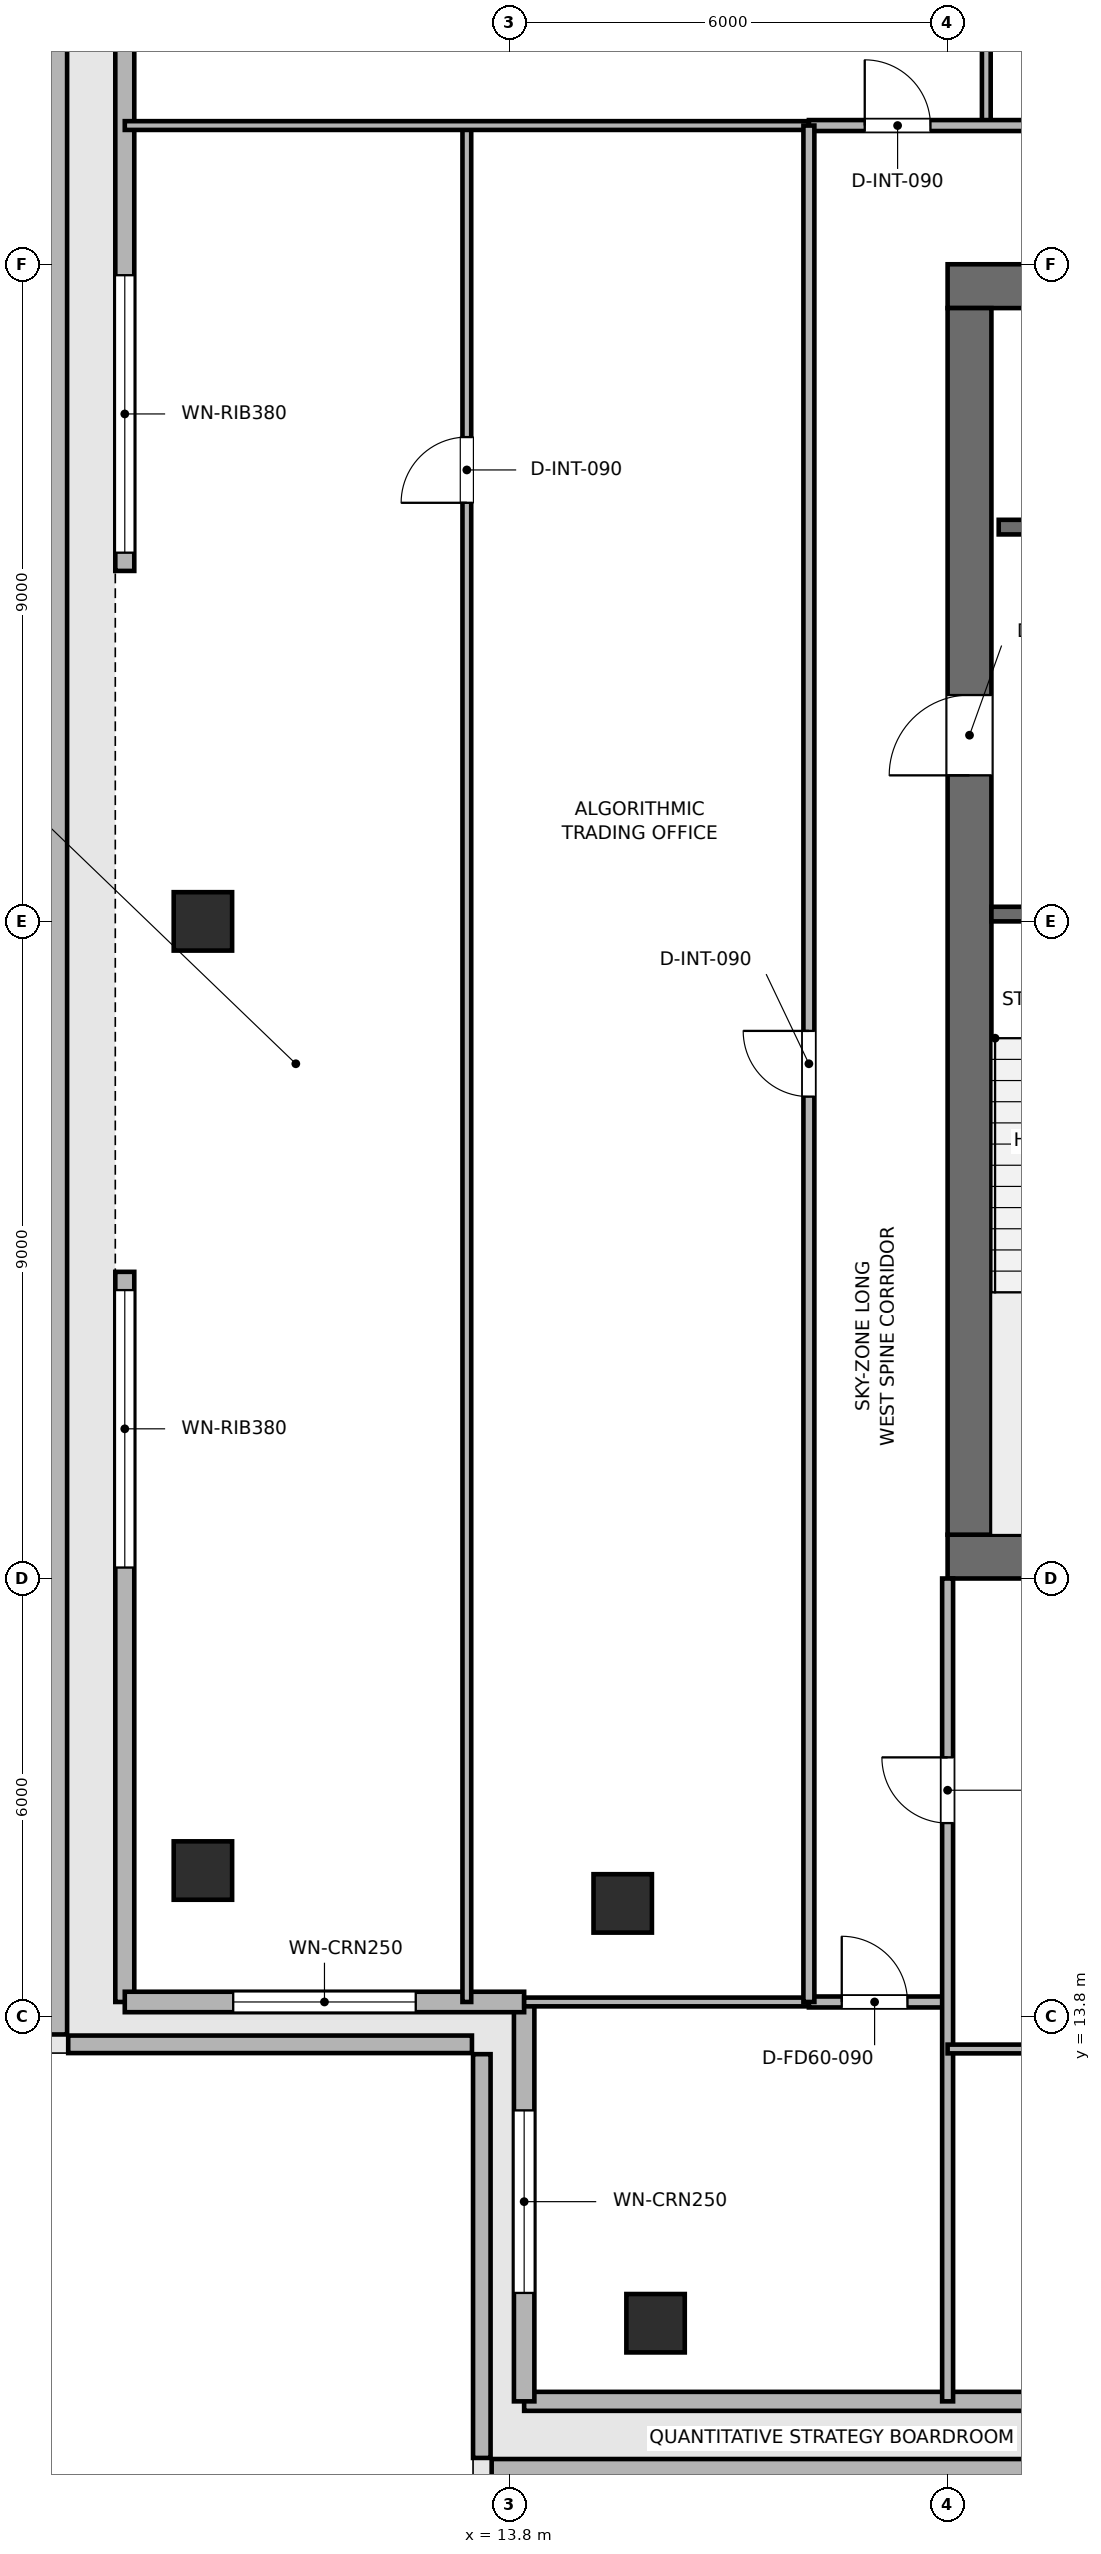
"""IFC4 building model, lengths in metres.
Left out: names, types, materials, properties, quantities, classifications, styles, units other than length and angle.
Written with IfcOpenShell. Run it as: python <this file> out.ifc"""

import sys

from ifc_helpers import new_model, si_unit, direction, frame, frame_2d, origin, origin_2d, place, context, subcontext, project, spatial, rectangle, extrude, element, fill, save


model = new_model("IFC4")
c1 = context("Model", 3, precision=1e-05, world=origin(), true_north=direction((0.0, 1.0)))
c2 = subcontext(c1, "Body", "Model", "MODEL_VIEW")
j1 = project(units=[si_unit("LENGTHUNIT", "METRE"), si_unit("PLANEANGLEUNIT", "RADIAN")], contexts=[c1])
p1 = place(None, origin())
s1 = spatial("IfcSite", under=j1, at=p1, CompositionType="ELEMENT")
p2 = place(p1, origin())
s2 = spatial("IfcBuilding", under=s1, at=p2, CompositionType="ELEMENT")
p3 = place(p2, frame((0.0, 0.0, 355.5)))
s3 = spatial("IfcBuildingStorey", under=s2, at=p3, CompositionType="ELEMENT", Elevation=355.5)
p4 = place(p3, frame((19.8, 20.1, 0.0), z_axis=(0.0, 0.0, 1.0), x_axis=(1.0, 0.0, 0.0)))
e1 = element("IfcWall", 1, at=p4, inside=s3, PredefinedType="SHEAR", context=c2, shape_type="SweptSolid", body=[
    extrude(rectangle(XDim=18.0, YDim=0.6, at=frame_2d((9.0, 0.0))), origin(), (0.0, 0.0, 1.0), 4.5),
])
p5 = place(p3, frame((19.8, 37.5, 0.0), z_axis=(0.0, 0.0, 1.0), x_axis=(1.0, 0.0, 0.0)))
e2 = element("IfcWall", 2, at=p5, inside=s3, PredefinedType="SHEAR", context=c2, shape_type="SweptSolid", body=[
    extrude(rectangle(XDim=18.0, YDim=0.6, at=frame_2d((9.0, 0.0))), origin(), (0.0, 0.0, 1.0), 4.5),
])
p6 = place(p5, frame((7.05, 0.0, 0.0)))
e3 = element("IfcOpeningElement", 3, at=p6, cuts=e2, PredefinedType="OPENING", context=c2, shape_type="SweptSolid", body=[
    extrude(rectangle(XDim=1.1, YDim=2.15, at=frame_2d((0.55, 1.075))), frame((0.0, 0.31, 0.0), z_axis=(0.0, -1.0, 0.0), x_axis=(1.0, 0.0, 0.0)), (0.0, 0.0, 1.0), 0.62),
])
p7 = place(p3, frame((20.1, 20.4, 0.0), z_axis=(0.0, 0.0, 1.0), x_axis=(0.0, 1.0, 0.0)))
e4 = element("IfcWall", 4, at=p7, inside=s3, PredefinedType="SHEAR", context=c2, shape_type="SweptSolid", body=[
    extrude(rectangle(XDim=16.8, YDim=0.6, at=frame_2d((8.4, 0.0))), origin(), (0.0, 0.0, 1.0), 4.5),
])
p8 = place(p7, frame((10.4, 0.0, 0.0)))
e5 = element("IfcOpeningElement", 5, at=p8, cuts=e4, PredefinedType="OPENING", context=c2, shape_type="SweptSolid", body=[
    extrude(rectangle(XDim=1.1, YDim=2.15, at=frame_2d((0.55, 1.075))), frame((0.0, 0.31, 0.0), z_axis=(0.0, -1.0, 0.0), x_axis=(1.0, 0.0, 0.0)), (0.0, 0.0, 1.0), 0.62),
])
for number, where, z_axis, x_axis in (
    (6, (15.8, 9.6, 0.003), (0.0, 0.0, 1.0), (1.0, 0.0, 0.0)),
    (7, (9.6, 28.8, 0.003), (0.0, 0.0, 1.0), (1.0, 0.0, 0.0)),
    (8, (9.6, 15.8, 0.003), (0.0, 0.0, 1.0), (1.0, 0.0, 0.0)),
    (9, (15.35, 15.35, 0.003), (0.0, 0.0, 1.0), (1.0, 0.0, 0.0)),
):
    element("IfcColumn", number, at=place(p3, frame(where, z_axis=z_axis, x_axis=x_axis)), inside=s3, PredefinedType="COLUMN", context=c2, shape_type="SweptSolid", body=[
        extrude(rectangle(XDim=0.8, YDim=0.8, at=origin_2d()), origin(), (0.0, 0.0, 1.0), 4.234),
    ])
for number, where, z_axis, x_axis in (
    (10, (13.555, 7.62, 0.0), (0.0, 0.0, 1.0), (1.0, 0.0, 0.0)),
    (11, (7.62, 44.045, 0.0), (0.0, 0.0, 1.0), (0.0, -1.0, 0.0)),
):
    element("IfcWall", number, at=place(p3, frame(where, z_axis=z_axis, x_axis=x_axis)), inside=s3, PredefinedType="PARAPET", context=c2, shape_type="SweptSolid", body=[
        extrude(rectangle(XDim=30.49, YDim=0.24, at=frame_2d((15.245, 0.0))), origin(), (0.0, 0.0, 1.0), 1.2),
    ])
for number, where, z_axis, x_axis in (
    (12, (7.755, 13.42, 0.0), (0.0, 0.0, 1.0), (1.0, 0.0, 0.0)),
    (13, (13.42, 13.285, 0.0), (0.0, 0.0, 1.0), (0.0, -1.0, 0.0)),
):
    element("IfcWall", number, at=place(p3, frame(where, z_axis=z_axis, x_axis=x_axis)), inside=s3, PredefinedType="PARAPET", context=c2, shape_type="SweptSolid", body=[
        extrude(rectangle(XDim=5.53, YDim=0.24, at=frame_2d((2.765, 0.0))), origin(), (0.0, 0.0, 1.0), 1.2),
    ])
p9 = place(p3, frame((24.0, 8.53, 0.0), z_axis=(0.0, 0.0, 1.0), x_axis=(-1.0, 0.0, 0.0)))
e14 = element("IfcWall", 14, at=p9, inside=s3, PredefinedType="SOLIDWALL", context=c2, shape_type="SweptSolid", body=[
    extrude(rectangle(XDim=10.0, YDim=0.26, at=frame_2d((5.0, 0.0))), origin(), (0.0, 0.0, 1.0), 4.24),
])
p10 = place(p9, frame((0.25, 0.0, 0.9)))
e15 = element("IfcOpeningElement", 15, at=p10, cuts=e14, PredefinedType="OPENING", context=c2, shape_type="SweptSolid", body=[
    extrude(rectangle(XDim=1.2, YDim=2.1, at=frame_2d((0.6, 1.05))), frame((0.0, 0.14, 0.0), z_axis=(0.0, -1.0, 0.0), x_axis=(1.0, 0.0, 0.0)), (0.0, 0.0, 1.0), 0.28),
])
p11 = place(p3, frame((8.53, 14.0, 0.0), z_axis=(0.0, 0.0, 1.0), x_axis=(0.0, 1.0, 0.0)))
e16 = element("IfcWall", 16, at=p11, inside=s3, PredefinedType="SOLIDWALL", context=c2, shape_type="SweptSolid", body=[
    extrude(rectangle(XDim=10.0, YDim=0.26, at=frame_2d((5.0, 0.0))), origin(), (0.0, 0.0, 1.0), 4.24),
])
p12 = place(p11, frame((5.95, 0.0, 0.9)))
e17 = element("IfcOpeningElement", 17, at=p12, cuts=e16, PredefinedType="OPENING", context=c2, shape_type="SweptSolid", body=[
    extrude(rectangle(XDim=3.8, YDim=1.9, at=frame_2d((1.9, 0.95))), frame((0.0, 0.14, 0.0), z_axis=(0.0, -1.0, 0.0), x_axis=(1.0, 0.0, 0.0)), (0.0, 0.0, 1.0), 0.28),
])
p13 = place(p3, frame((8.53, 33.6, 0.0), z_axis=(0.0, 0.0, 1.0), x_axis=(0.0, 1.0, 0.0)))
e18 = element("IfcWall", 18, at=p13, inside=s3, PredefinedType="SOLIDWALL", context=c2, shape_type="SweptSolid", body=[
    extrude(rectangle(XDim=10.0, YDim=0.26, at=frame_2d((5.0, 0.0))), origin(), (0.0, 0.0, 1.0), 4.24),
])
p14 = place(p13, frame((0.25, 0.0, 0.9)))
e19 = element("IfcOpeningElement", 19, at=p14, cuts=e18, PredefinedType="OPENING", context=c2, shape_type="SweptSolid", body=[
    extrude(rectangle(XDim=3.8, YDim=1.9, at=frame_2d((1.9, 0.95))), frame((0.0, 0.14, 0.0), z_axis=(0.0, -1.0, 0.0), x_axis=(1.0, 0.0, 0.0)), (0.0, 0.0, 1.0), 0.28),
])
p15 = place(p3, frame((14.0, 8.53, 0.0), z_axis=(0.0, 0.0, 1.0), x_axis=(0.0, 1.0, 0.0)))
e20 = element("IfcWall", 20, at=p15, inside=s3, PredefinedType="SOLIDWALL", context=c2, shape_type="SweptSolid", body=[
    extrude(rectangle(XDim=5.47, YDim=0.28, at=frame_2d((2.735, 0.0))), origin(), (0.0, 0.0, 1.0), 4.24),
])
p16 = place(p15, frame((1.485, 0.0, 0.9)))
e21 = element("IfcOpeningElement", 21, at=p16, cuts=e20, PredefinedType="OPENING", context=c2, shape_type="SweptSolid", body=[
    extrude(rectangle(XDim=2.5, YDim=1.9, at=frame_2d((1.25, 0.95))), frame((0.0, 0.15, 0.0), z_axis=(0.0, -1.0, 0.0), x_axis=(1.0, 0.0, 0.0)), (0.0, 0.0, 1.0), 0.3),
])
p17 = place(p3, frame((14.0, 14.0, 0.0), z_axis=(0.0, 0.0, 1.0), x_axis=(-1.0, 0.0, 0.0)))
e22 = element("IfcWall", 22, at=p17, inside=s3, PredefinedType="SOLIDWALL", context=c2, shape_type="SweptSolid", body=[
    extrude(rectangle(XDim=5.47, YDim=0.28, at=frame_2d((2.735, 0.0))), origin(), (0.0, 0.0, 1.0), 4.24),
])
p18 = place(p17, frame((1.485, 0.0, 0.9)))
e23 = element("IfcOpeningElement", 23, at=p18, cuts=e22, PredefinedType="OPENING", context=c2, shape_type="SweptSolid", body=[
    extrude(rectangle(XDim=2.5, YDim=1.9, at=frame_2d((1.25, 0.95))), frame((0.0, 0.15, 0.0), z_axis=(0.0, -1.0, 0.0), x_axis=(1.0, 0.0, 0.0)), (0.0, 0.0, 1.0), 0.3),
])
p19 = place(p3, frame((20.4, 28.9, 0.0), z_axis=(0.0, 0.0, 1.0), x_axis=(1.0, 0.0, 0.0)))
e24 = element("IfcWall", 24, at=p19, inside=s3, PredefinedType="SHEAR", context=c2, shape_type="SweptSolid", body=[
    extrude(rectangle(XDim=3.15, YDim=0.2, at=frame_2d((1.575, 0.0))), origin(), (0.0, 0.0, 1.0), 4.24),
])
p20 = place(p19, frame((0.8, 0.0, 0.0)))
e25 = element("IfcOpeningElement", 25, at=p20, cuts=e24, PredefinedType="OPENING", context=c2, shape_type="SweptSolid", body=[
    extrude(rectangle(XDim=1.0, YDim=2.1, at=frame_2d((0.5, 1.05))), frame((0.0, 0.11, 0.0), z_axis=(0.0, -1.0, 0.0), x_axis=(1.0, 0.0, 0.0)), (0.0, 0.0, 1.0), 0.22),
])
p21 = place(p3, frame((20.5, 34.2, 0.0), z_axis=(0.0, 0.0, 1.0), x_axis=(1.0, 0.0, 0.0)))
e26 = element("IfcWall", 26, at=p21, inside=s3, PredefinedType="SHEAR", context=c2, shape_type="SweptSolid", body=[
    extrude(rectangle(XDim=3.05, YDim=0.2, at=frame_2d((1.525, 0.0))), origin(), (0.0, 0.0, 1.0), 4.24),
])
p22 = place(p21, frame((0.75, 0.0, 0.0)))
e27 = element("IfcOpeningElement", 27, at=p22, cuts=e26, PredefinedType="OPENING", context=c2, shape_type="SweptSolid", body=[
    extrude(rectangle(XDim=1.1, YDim=2.15, at=frame_2d((0.55, 1.075))), frame((0.0, 0.11, 0.0), z_axis=(0.0, -1.0, 0.0), x_axis=(1.0, 0.0, 0.0)), (0.0, 0.0, 1.0), 0.22),
])
p23 = place(p3, frame((20.33, 39.7, 0.0), z_axis=(0.0, 0.0, 1.0), x_axis=(0.0, 1.0, 0.0)))
e28 = element("IfcWall", 28, at=p23, inside=s3, PredefinedType="PARTITIONING", context=c2, shape_type="SweptSolid", body=[
    extrude(rectangle(XDim=9.37, YDim=0.12, at=frame_2d((4.685, 0.0))), origin(), (0.0, 0.0, 1.0), 3.825),
])
p24 = place(p3, frame((13.215, 14.0, 0.0), z_axis=(0.0, 0.0, 1.0), x_axis=(0.0, 1.0, 0.0)))
e29 = element("IfcWall", 29, at=p24, inside=s3, PredefinedType="PARTITIONING", context=c2, shape_type="SweptSolid", body=[
    extrude(rectangle(XDim=25.7, YDim=0.12, at=frame_2d((12.85, 0.0))), origin(), (0.0, 0.0, 1.0), 3.825),
])
p25 = place(p24, frame((20.533, 0.0, 0.0)))
e30 = element("IfcOpeningElement", 30, at=p25, cuts=e29, PredefinedType="OPENING", context=c2, shape_type="SweptSolid", body=[
    extrude(rectangle(XDim=0.9, YDim=2.1, at=frame_2d((0.45, 1.05))), frame((0.0, 0.07, 0.0), z_axis=(0.0, -1.0, 0.0), x_axis=(1.0, 0.0, 0.0)), (0.0, 0.0, 1.0), 0.14),
])
p26 = place(p3, frame((14.0, 14.0, 0.0), z_axis=(0.0, 0.0, 1.0), x_axis=(1.0, 0.0, 0.0)))
e31 = element("IfcWall", 31, at=p26, inside=s3, PredefinedType="PARTITIONING", context=c2, shape_type="SweptSolid", body=[
    extrude(rectangle(XDim=3.9, YDim=0.12, at=frame_2d((1.95, 0.0))), origin(), (0.0, 0.0, 1.0), 3.925),
])
p27 = place(p3, frame((17.9, 14.0, 0.0), z_axis=(0.0, 0.0, 1.0), x_axis=(1.0, 0.0, 0.0)))
e32 = element("IfcWall", 32, at=p27, inside=s3, PredefinedType="PARTITIONING", context=c2, shape_type="SweptSolid", body=[
    extrude(rectangle(XDim=1.9, YDim=0.15, at=frame_2d((0.95, 0.0))), origin(), (0.0, 0.0, 1.0), 4.24),
])
p28 = place(p27, frame((0.45, 0.0, 0.0)))
e33 = element("IfcOpeningElement", 33, at=p28, cuts=e32, PredefinedType="OPENING", context=c2, shape_type="SweptSolid", body=[
    extrude(rectangle(XDim=0.9, YDim=2.1, at=frame_2d((0.45, 1.05))), frame((0.0, 0.085, 0.0), z_axis=(0.0, -1.0, 0.0), x_axis=(1.0, 0.0, 0.0)), (0.0, 0.0, 1.0), 0.17),
])
p29 = place(p3, frame((19.8, 8.53, 0.0), z_axis=(0.0, 0.0, 1.0), x_axis=(0.0, 1.0, 0.0)))
e34 = element("IfcWall", 34, at=p29, inside=s3, PredefinedType="PARTITIONING", context=c2, shape_type="SweptSolid", body=[
    extrude(rectangle(XDim=11.27, YDim=0.15, at=frame_2d((5.635, 0.0))), origin(), (0.0, 0.0, 1.0), 3.825),
])
p30 = place(p29, frame((7.92, 0.0, 0.0)))
e35 = element("IfcOpeningElement", 35, at=p30, cuts=e34, PredefinedType="OPENING", context=c2, shape_type="SweptSolid", body=[
    extrude(rectangle(XDim=0.9, YDim=2.1, at=frame_2d((0.45, 1.05))), frame((0.0, 0.085, 0.0), z_axis=(0.0, -1.0, 0.0), x_axis=(1.0, 0.0, 0.0)), (0.0, 0.0, 1.0), 0.17),
])
p31 = place(p3, frame((19.8, 13.356, 0.0), z_axis=(0.0, 0.0, 1.0), x_axis=(1.0, 0.0, 0.0)))
e36 = element("IfcWall", 36, at=p31, inside=s3, PredefinedType="PARTITIONING", context=c2, shape_type="SweptSolid", body=[
    extrude(rectangle(XDim=6.908, YDim=0.12, at=frame_2d((3.454, 0.0))), origin(), (0.0, 0.0, 1.0), 3.825),
])
p32 = place(p31, frame((2.303, 0.0, 0.0)))
e37 = element("IfcOpeningElement", 37, at=p32, cuts=e36, PredefinedType="OPENING", context=c2, shape_type="SweptSolid", body=[
    extrude(rectangle(XDim=0.9, YDim=2.1, at=frame_2d((0.45, 1.05))), frame((0.0, 0.07, 0.0), z_axis=(0.0, -1.0, 0.0), x_axis=(1.0, 0.0, 0.0)), (0.0, 0.0, 1.0), 0.14),
])
p33 = place(p3, frame((8.53, 39.7, 0.0), z_axis=(0.0, 0.0, 1.0), x_axis=(1.0, 0.0, 0.0)))
e38 = element("IfcWall", 38, at=p33, inside=s3, PredefinedType="PARTITIONING", context=c2, shape_type="SweptSolid", body=[
    extrude(rectangle(XDim=9.37, YDim=0.12, at=frame_2d((4.685, 0.0))), origin(), (0.0, 0.0, 1.0), 3.825),
])
p34 = place(p3, frame((17.9, 39.7, 0.0), z_axis=(0.0, 0.0, 1.0), x_axis=(1.0, 0.0, 0.0)))
e39 = element("IfcWall", 39, at=p34, inside=s3, PredefinedType="PARTITIONING", context=c2, shape_type="SweptSolid", body=[
    extrude(rectangle(XDim=21.8, YDim=0.15, at=frame_2d((10.9, 0.0))), origin(), (0.0, 0.0, 1.0), 3.825),
])
p35 = place(p34, frame((0.765, 0.0, 0.0)))
e40 = element("IfcOpeningElement", 40, at=p35, cuts=e39, PredefinedType="OPENING", context=c2, shape_type="SweptSolid", body=[
    extrude(rectangle(XDim=0.9, YDim=2.1, at=frame_2d((0.45, 1.05))), frame((0.0, 0.085, 0.0), z_axis=(0.0, -1.0, 0.0), x_axis=(1.0, 0.0, 0.0)), (0.0, 0.0, 1.0), 0.17),
])
p36 = place(p34, frame((6.195, 0.0, 0.0)))
e41 = element("IfcOpeningElement", 41, at=p36, cuts=e39, PredefinedType="OPENING", context=c2, shape_type="SweptSolid", body=[
    extrude(rectangle(XDim=0.9, YDim=2.1, at=frame_2d((0.45, 1.05))), frame((0.0, 0.085, 0.0), z_axis=(0.0, -1.0, 0.0), x_axis=(1.0, 0.0, 0.0)), (0.0, 0.0, 1.0), 0.17),
])
p37 = place(p34, frame((15.88, 0.0, 0.0)))
e42 = element("IfcOpeningElement", 42, at=p37, cuts=e39, PredefinedType="OPENING", context=c2, shape_type="SweptSolid", body=[
    extrude(rectangle(XDim=0.9, YDim=2.1, at=frame_2d((0.45, 1.05))), frame((0.0, 0.085, 0.0), z_axis=(0.0, -1.0, 0.0), x_axis=(1.0, 0.0, 0.0)), (0.0, 0.0, 1.0), 0.17),
])
p38 = place(p3, frame((17.9, 14.0, 0.0), z_axis=(0.0, 0.0, 1.0), x_axis=(0.0, 1.0, 0.0)))
e43 = element("IfcWall", 43, at=p38, inside=s3, PredefinedType="PARTITIONING", context=c2, shape_type="SweptSolid", body=[
    extrude(rectangle(XDim=25.7, YDim=0.15, at=frame_2d((12.85, 0.0))), origin(), (0.0, 0.0, 1.0), 3.825),
])
p39 = place(p38, frame((12.4, 0.0, 0.0)))
e44 = element("IfcOpeningElement", 44, at=p39, cuts=e43, PredefinedType="OPENING", context=c2, shape_type="SweptSolid", body=[
    extrude(rectangle(XDim=0.9, YDim=2.1, at=frame_2d((0.45, 1.05))), frame((0.0, 0.085, 0.0), z_axis=(0.0, -1.0, 0.0), x_axis=(1.0, 0.0, 0.0)), (0.0, 0.0, 1.0), 0.17),
])
p40 = place(p12, origin())
e45 = element("IfcWindow", 45, at=p40, inside=s3, PartitioningType="SINGLE_PANEL", PredefinedType="WINDOW", context=c2, shape_type="SweptSolid", body=[
    extrude(rectangle(XDim=3.8, YDim=1.9, at=frame_2d((1.9, 0.95))), frame((0.0, 0.03, 0.0), z_axis=(0.0, -1.0, 0.0), x_axis=(1.0, 0.0, 0.0)), (0.0, 0.0, 1.0), 0.06),
])
fill(e17, e45)
p41 = place(p14, origin())
e46 = element("IfcWindow", 46, at=p41, inside=s3, PartitioningType="SINGLE_PANEL", PredefinedType="WINDOW", context=c2, shape_type="SweptSolid", body=[
    extrude(rectangle(XDim=3.8, YDim=1.9, at=frame_2d((1.9, 0.95))), frame((0.0, 0.03, 0.0), z_axis=(0.0, -1.0, 0.0), x_axis=(1.0, 0.0, 0.0)), (0.0, 0.0, 1.0), 0.06),
])
fill(e19, e46)
p42 = place(p16, origin())
e47 = element("IfcWindow", 47, at=p42, inside=s3, PartitioningType="SINGLE_PANEL", PredefinedType="WINDOW", context=c2, shape_type="SweptSolid", body=[
    extrude(rectangle(XDim=2.5, YDim=1.9, at=frame_2d((1.25, 0.95))), frame((0.0, 0.03, 0.0), z_axis=(0.0, -1.0, 0.0), x_axis=(1.0, 0.0, 0.0)), (0.0, 0.0, 1.0), 0.06),
])
fill(e21, e47)
p43 = place(p18, origin())
e48 = element("IfcWindow", 48, at=p43, inside=s3, PartitioningType="SINGLE_PANEL", PredefinedType="WINDOW", context=c2, shape_type="SweptSolid", body=[
    extrude(rectangle(XDim=2.5, YDim=1.9, at=frame_2d((1.25, 0.95))), frame((0.0, 0.03, 0.0), z_axis=(0.0, -1.0, 0.0), x_axis=(1.0, 0.0, 0.0)), (0.0, 0.0, 1.0), 0.06),
])
fill(e23, e48)
p44 = place(p25, origin())
e49 = element("IfcDoor", 49, at=p44, inside=s3, OperationType="SINGLE_SWING_LEFT", PredefinedType="DOOR", context=c2, shape_type="SweptSolid", body=[
    extrude(rectangle(XDim=0.9, YDim=2.1, at=frame_2d((0.45, 1.05))), frame((0.0, 0.025, 0.0), z_axis=(0.0, -1.0, 0.0), x_axis=(1.0, 0.0, 0.0)), (0.0, 0.0, 1.0), 0.05),
])
fill(e30, e49)
p45 = place(p28, origin())
e50 = element("IfcDoor", 50, at=p45, inside=s3, OperationType="SINGLE_SWING_LEFT", PredefinedType="DOOR", context=c2, shape_type="SweptSolid", body=[
    extrude(rectangle(XDim=0.9, YDim=2.1, at=frame_2d((0.45, 1.05))), frame((0.0, 0.025, 0.0), z_axis=(0.0, -1.0, 0.0), x_axis=(1.0, 0.0, 0.0)), (0.0, 0.0, 1.0), 0.05),
])
fill(e33, e50)
p46 = place(p30, origin())
e51 = element("IfcDoor", 51, at=p46, inside=s3, OperationType="SINGLE_SWING_RIGHT", PredefinedType="DOOR", context=c2, shape_type="SweptSolid", body=[
    extrude(rectangle(XDim=0.9, YDim=2.1, at=frame_2d((0.45, 1.05))), frame((0.0, 0.025, 0.0), z_axis=(0.0, -1.0, 0.0), x_axis=(1.0, 0.0, 0.0)), (0.0, 0.0, 1.0), 0.05),
])
fill(e35, e51)
p47 = place(p35, origin())
e52 = element("IfcDoor", 52, at=p47, inside=s3, OperationType="SINGLE_SWING_LEFT", PredefinedType="DOOR", context=c2, shape_type="SweptSolid", body=[
    extrude(rectangle(XDim=0.9, YDim=2.1, at=frame_2d((0.45, 1.05))), frame((0.0, 0.025, 0.0), z_axis=(0.0, -1.0, 0.0), x_axis=(1.0, 0.0, 0.0)), (0.0, 0.0, 1.0), 0.05),
])
fill(e40, e52)
p48 = place(p39, origin())
e53 = element("IfcDoor", 53, at=p48, inside=s3, OperationType="SINGLE_SWING_RIGHT", PredefinedType="DOOR", context=c2, shape_type="SweptSolid", body=[
    extrude(rectangle(XDim=0.9, YDim=2.1, at=frame_2d((0.45, 1.05))), frame((0.0, 0.025, 0.0), z_axis=(0.0, -1.0, 0.0), x_axis=(1.0, 0.0, 0.0)), (0.0, 0.0, 1.0), 0.05),
])
fill(e44, e53)
p49 = place(p8, origin())
e54 = element("IfcDoor", 54, at=p49, inside=s3, OperationType="SINGLE_SWING_LEFT", PredefinedType="DOOR", context=c2, shape_type="SweptSolid", body=[
    extrude(rectangle(XDim=1.1, YDim=2.15, at=frame_2d((0.55, 1.075))), frame((0.0, 0.025, 0.0), z_axis=(0.0, -1.0, 0.0), x_axis=(1.0, 0.0, 0.0)), (0.0, 0.0, 1.0), 0.05),
])
fill(e5, e54)
save(model, sys.argv[1])
